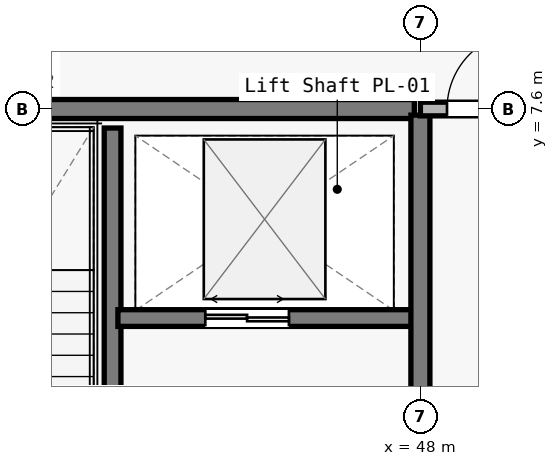
"""IFC4 building model, lengths in metres.
Left out: names, types, materials, properties, quantities, classifications, styles, units other than length and angle.
Written with IfcOpenShell. Run it as: python <this file> out.ifc"""

import sys

from ifc_helpers import new_model, si_unit, direction, frame, frame_2d, origin, place, context, subcontext, project, spatial, rectangle, extrude, element, fill, save


model = new_model("IFC4")
c1 = context("Model", 3, precision=1e-05, world=origin(), true_north=direction((0.0, 1.0)))
c2 = subcontext(c1, "Body", "Model", "MODEL_VIEW")
j1 = project(units=[si_unit("LENGTHUNIT", "METRE"), si_unit("PLANEANGLEUNIT", "RADIAN")], contexts=[c1])
p1 = place(None, origin())
s1 = spatial("IfcSite", under=j1, at=p1, CompositionType="ELEMENT")
p2 = place(p1, origin())
s2 = spatial("IfcBuilding", under=s1, at=p2, CompositionType="ELEMENT")
p3 = place(p2, frame((0.0, 0.0, 15.0)))
s3 = spatial("IfcBuildingStorey", under=s2, at=p3, CompositionType="ELEMENT", Elevation=15.0)
p4 = place(p3, frame((40.15, 7.6, 0.0), z_axis=(0.0, 0.0, 1.0), x_axis=(1.0, 0.0, 0.0)))
e1 = element("IfcWall", 1, at=p4, inside=s3, PredefinedType="SOLIDWALL", context=c2, shape_type="SweptSolid", body=[
    extrude(rectangle(XDim=7.77, YDim=0.25, at=frame_2d((3.885, 0.0))), origin(), (0.0, 0.0, 1.0), 3.42),
])
p5 = place(p3, frame((43.95, 0.25, 0.0), z_axis=(0.0, 0.0, 1.0), x_axis=(0.0, 1.0, 0.0)))
e2 = element("IfcWall", 2, at=p5, inside=s3, PredefinedType="SOLIDWALL", context=c2, shape_type="SweptSolid", body=[
    extrude(rectangle(XDim=7.1, YDim=0.22, at=frame_2d((3.55, 0.0))), origin(), (0.0, 0.0, 1.0), 4.53),
])
p6 = place(p5, frame((0.35, 0.0, 0.0)))
e3 = element("IfcOpeningElement", 3, at=p6, cuts=e2, PredefinedType="OPENING", context=c2, shape_type="SweptSolid", body=[
    extrude(rectangle(XDim=1.2, YDim=2.15, at=frame_2d((0.6, 1.075))), frame((0.0, 0.12, 0.0), z_axis=(0.0, -1.0, 0.0), x_axis=(1.0, 0.0, 0.0)), (0.0, 0.0, 1.0), 0.24),
])
p7 = place(p3, frame((44.02, 4.85, 0.0), z_axis=(0.0, 0.0, 1.0), x_axis=(1.0, 0.0, 0.0)))
e4 = element("IfcWall", 4, at=p7, inside=s3, PredefinedType="SOLIDWALL", context=c2, shape_type="SweptSolid", body=[
    extrude(rectangle(XDim=3.93, YDim=0.22, at=frame_2d((1.965, 0.0))), origin(), (0.0, 0.0, 1.0), 3.945),
])
p8 = place(p7, frame((1.15, 0.0, 0.0)))
e5 = element("IfcOpeningElement", 5, at=p8, cuts=e4, PredefinedType="OPENING", context=c2, shape_type="SweptSolid", body=[
    extrude(rectangle(XDim=1.1, YDim=2.2, at=frame_2d((0.55, 1.1))), frame((0.0, 0.12, 0.0), z_axis=(0.0, -1.0, 0.0), x_axis=(1.0, 0.0, 0.0)), (0.0, 0.0, 1.0), 0.24),
])
p9 = place(p3, frame((48.0, 0.08, 0.0), z_axis=(0.0, 0.0, 1.0), x_axis=(0.0, 1.0, 0.0)))
e6 = element("IfcWall", 6, at=p9, inside=s3, PredefinedType="SOLIDWALL", context=c2, shape_type="SweptSolid", body=[
    extrude(rectangle(XDim=7.44, YDim=0.25, at=frame_2d((3.72, 0.0))), origin(), (0.0, 0.0, 1.0), 3.42),
])
p10 = place(p9, frame((2.27, 0.0, 0.0)))
e7 = element("IfcOpeningElement", 7, at=p10, cuts=e6, PredefinedType="OPENING", context=c2, shape_type="SweptSolid", body=[
    extrude(rectangle(XDim=1.35, YDim=2.2, at=frame_2d((0.675, 1.1))), frame((0.0, 0.135, 0.0), z_axis=(0.0, -1.0, 0.0), x_axis=(1.0, 0.0, 0.0)), (0.0, 0.0, 1.0), 0.27),
])
p11 = place(p3, frame((48.0, 7.6, 0.0), z_axis=(0.0, 0.0, 1.0), x_axis=(1.0, 0.0, 0.0)))
e8 = element("IfcWall", 8, at=p11, inside=s3, PredefinedType="PARTITIONING", context=c2, shape_type="SweptSolid", body=[
    extrude(rectangle(XDim=7.88, YDim=0.18, at=frame_2d((3.94, 0.0))), origin(), (0.0, 0.0, 1.0), 3.42),
])
p12 = place(p11, frame((0.35, 0.0, 0.0)))
e9 = element("IfcOpeningElement", 9, at=p12, cuts=e8, PredefinedType="OPENING", context=c2, shape_type="SweptSolid", body=[
    extrude(rectangle(XDim=1.02, YDim=2.1, at=frame_2d((0.51, 1.05))), frame((0.0, 0.1, 0.0), z_axis=(0.0, -1.0, 0.0), x_axis=(1.0, 0.0, 0.0)), (0.0, 0.0, 1.0), 0.2),
])
p13 = place(p8, origin())
e10 = element("IfcDoor", 10, at=p13, inside=s3, OperationType="DOUBLE_DOOR_SLIDING", PredefinedType="DOOR", context=c2, shape_type="SweptSolid", body=[
    extrude(rectangle(XDim=1.1, YDim=2.2, at=frame_2d((0.55, 1.1))), frame((0.0, 0.025, 0.0), z_axis=(0.0, -1.0, 0.0), x_axis=(1.0, 0.0, 0.0)), (0.0, 0.0, 1.0), 0.05),
])
fill(e5, e10)
p14 = place(p12, origin())
e11 = element("IfcDoor", 11, at=p14, inside=s3, OperationType="SINGLE_SWING_RIGHT", PredefinedType="DOOR", context=c2, shape_type="SweptSolid", body=[
    extrude(rectangle(XDim=1.02, YDim=2.1, at=frame_2d((0.51, 1.05))), frame((0.0, 0.025, 0.0), z_axis=(0.0, -1.0, 0.0), x_axis=(1.0, 0.0, 0.0)), (0.0, 0.0, 1.0), 0.05),
])
fill(e9, e11)
save(model, sys.argv[1])
